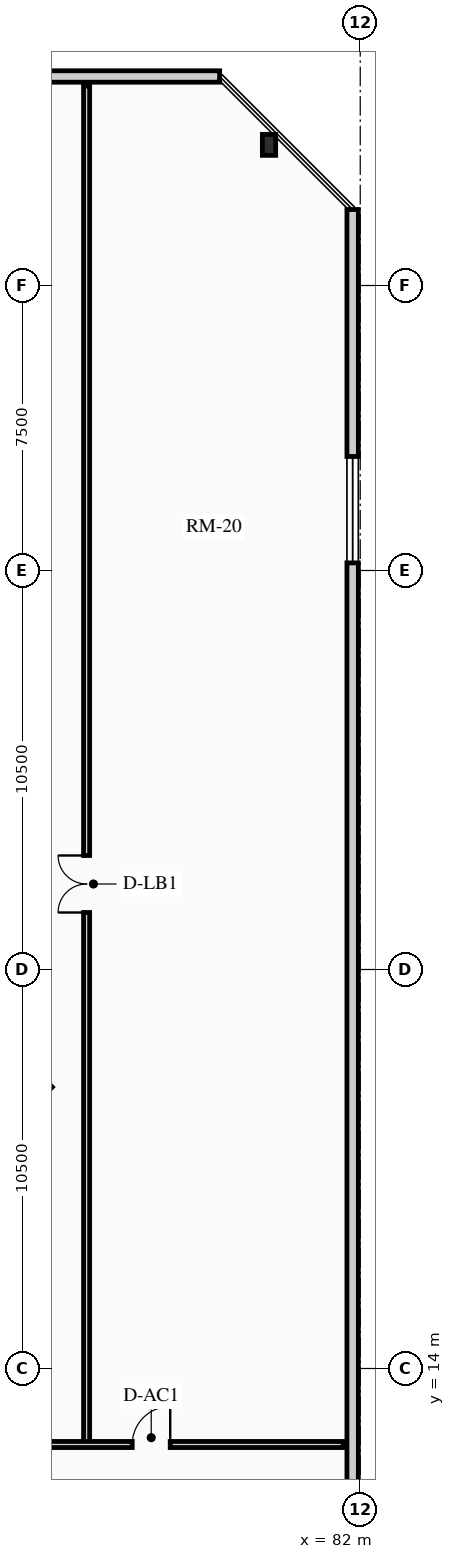
"""IFC4 building model, lengths in metres.
Left out: names, types, materials, properties, quantities, classifications, styles, units other than length and angle.
Written with IfcOpenShell. Run it as: python <this file> out.ifc"""

import sys

from ifc_helpers import new_model, si_unit, direction, frame, frame_2d, origin, origin_2d, place, context, subcontext, project, spatial, rectangle, hollow_rectangle, extrude, source, transform, mapped, element, fill, save


model = new_model("IFC4")
c1 = context("Model", 3, precision=1e-05, world=origin(), true_north=direction((0.0, 1.0)))
c2 = subcontext(c1, "Body", "Model", "MODEL_VIEW")
j1 = project(units=[si_unit("LENGTHUNIT", "METRE"), si_unit("PLANEANGLEUNIT", "RADIAN")], contexts=[c1])
p1 = place(None, origin())
s1 = spatial("IfcSite", under=j1, at=p1, CompositionType="ELEMENT")
p2 = place(p1, origin())
s2 = spatial("IfcBuilding", under=s1, at=p2, CompositionType="ELEMENT")
p3 = place(p2, frame((0.0, 0.0, 13.2)))
s3 = spatial("IfcBuildingStorey", under=s2, at=p3, CompositionType="ELEMENT", Elevation=13.2)
p4 = place(p3, frame((79.6, 46.2, 0.0), z_axis=(0.0, 0.0, 1.0), x_axis=(1.0, 0.0, 0.0)))
e1 = element("IfcColumn", 1, at=p4, inside=s3, PredefinedType="PILASTER", context=c2, shape_type="SweptSolid", body=[
    extrude(hollow_rectangle(XDim=0.35, YDim=0.55, WallThickness=0.022, at=origin_2d()), origin(), (0.0, 0.0, 1.0), 4.2),
])
p5 = place(p3, frame((3.8, 48.0, 0.0), z_axis=(0.0, 0.0, 1.0), x_axis=(1.0, 0.0, 0.0)))
e2 = element("IfcWall", 2, at=p5, inside=s3, PredefinedType="SOLIDWALL", context=c2, shape_type="SweptSolid", body=[
    extrude(rectangle(XDim=74.5, YDim=0.3, at=frame_2d((37.25, 0.0))), origin(), (0.0, 0.0, 1.0), 3.8),
])
m1 = source(origin(), c2, "Body", "SweptSolid", [
    extrude(rectangle(XDim=2.8, YDim=2.1, at=frame_2d((1.4, 1.05))), frame((0.0, 0.16, 0.0), z_axis=(0.0, -1.0, 0.0), x_axis=(1.0, 0.0, 0.0)), (0.0, 0.0, 1.0), 0.32),
])
p6 = place(p5, frame((6.5, 0.0, 0.8)))
e3 = element("IfcOpeningElement", 3, at=p6, cuts=e2, PredefinedType="OPENING", context=c2, shape_type="MappedRepresentation", body=[
    mapped(m1, transform((0.0, 0.0, 0.0), x_axis=(1.0, 0.0, 0.0), y_axis=(0.0, 1.0, 0.0), z_axis=(0.0, 0.0, 1.0), scale=1.0)),
])
p7 = place(p5, frame((39.5, 0.0, 0.8)))
e4 = element("IfcOpeningElement", 4, at=p7, cuts=e2, PredefinedType="OPENING", context=c2, shape_type="MappedRepresentation", body=[
    mapped(m1, transform((0.0, 0.0, 0.0), x_axis=(1.0, 0.0, 0.0), y_axis=(0.0, 1.0, 0.0), z_axis=(0.0, 0.0, 1.0), scale=1.0)),
])
p8 = place(p3, frame((81.8, 44.5, 0.0), z_axis=(0.0, 0.0, 1.0), x_axis=(0.0, -1.0, 0.0)))
e5 = element("IfcWall", 5, at=p8, inside=s3, PredefinedType="SOLIDWALL", context=c2, shape_type="SweptSolid", body=[
    extrude(rectangle(XDim=40.0, YDim=0.3, at=frame_2d((20.0, 0.0))), origin(), (0.0, 0.0, 1.0), 3.8),
])
p9 = place(p8, frame((6.5, 0.0, 0.8)))
e6 = element("IfcOpeningElement", 6, at=p9, cuts=e5, PredefinedType="OPENING", context=c2, shape_type="MappedRepresentation", body=[
    mapped(m1, transform((0.0, 0.0, 0.0), x_axis=(1.0, 0.0, 0.0), y_axis=(0.0, 1.0, 0.0), z_axis=(0.0, 0.0, 1.0), scale=1.0)),
])
p10 = place(p3, frame((74.8, 12.0, 0.0), z_axis=(0.0, 0.0, 1.0), x_axis=(0.0, 1.0, 0.0)))
e7 = element("IfcWall", 7, at=p10, inside=s3, PredefinedType="PARTITIONING", context=c2, shape_type="SweptSolid", body=[
    extrude(rectangle(XDim=35.75, YDim=0.16, at=frame_2d((17.875, 0.0))), origin(), (0.0, 0.0, 1.0), 2.844),
])
m2 = source(origin(), c2, "Body", "SweptSolid", [
    extrude(rectangle(XDim=1.5, YDim=2.02, at=frame_2d((0.75, 1.01))), frame((0.0, 0.09, 0.0), z_axis=(0.0, -1.0, 0.0), x_axis=(1.0, 0.0, 0.0)), (0.0, 0.0, 1.0), 0.18),
])
p11 = place(p10, frame((14.0, 0.0, 0.0)))
e8 = element("IfcOpeningElement", 8, at=p11, cuts=e7, PredefinedType="OPENING", context=c2, shape_type="MappedRepresentation", body=[
    mapped(m2, transform((0.0, 0.0, 0.0), x_axis=(1.0, 0.0, 0.0), y_axis=(0.0, 1.0, 0.0), z_axis=(0.0, 0.0, 1.0), scale=1.0)),
])
p12 = place(p3, frame((32.5, 12.0, 0.0), z_axis=(0.0, 0.0, 1.0), x_axis=(1.0, 0.0, 0.0)))
e9 = element("IfcWall", 9, at=p12, inside=s3, PredefinedType="PARTITIONING", context=c2, shape_type="SweptSolid", body=[
    extrude(rectangle(XDim=49.05, YDim=0.16, at=frame_2d((24.525, 0.0))), origin(), (0.0, 0.0, 1.0), 2.844),
])
p13 = place(p12, frame((5.5, 0.0, 0.0)))
e10 = element("IfcOpeningElement", 10, at=p13, cuts=e9, PredefinedType="OPENING", context=c2, shape_type="MappedRepresentation", body=[
    mapped(m2, transform((0.0, 0.0, 0.0), x_axis=(1.0, 0.0, 0.0), y_axis=(0.0, 1.0, 0.0), z_axis=(0.0, 0.0, 1.0), scale=1.0)),
])
m3 = source(origin(), c2, "Body", "SweptSolid", [
    extrude(rectangle(XDim=1.0, YDim=2.015, at=frame_2d((0.5, 1.007))), frame((0.0, 0.09, 0.0), z_axis=(0.0, -1.0, 0.0), x_axis=(1.0, 0.0, 0.0)), (0.0, 0.0, 1.0), 0.18),
])
p14 = place(p12, frame((43.5, 0.0, 0.0)))
e11 = element("IfcOpeningElement", 11, at=p14, cuts=e9, PredefinedType="OPENING", context=c2, shape_type="MappedRepresentation", body=[
    mapped(m3, transform((0.0, 0.0, 0.0), x_axis=(1.0, 0.0, 0.0), y_axis=(0.0, 1.0, 0.0), z_axis=(0.0, 0.0, 1.0), scale=1.0)),
])
m4 = source(origin(), c2, "Body", "SweptSolid", [
    extrude(rectangle(XDim=2.8, YDim=2.1, at=frame_2d((1.4, 1.05))), frame((0.0, 0.03, 0.0), z_axis=(0.0, -1.0, 0.0), x_axis=(1.0, 0.0, 0.0)), (0.0, 0.0, 1.0), 0.06),
])
p15 = place(p9, origin())
e12 = element("IfcWindow", 12, at=p15, inside=s3, PartitioningType="TRIPLE_PANEL_VERTICAL", PredefinedType="WINDOW", context=c2, shape_type="MappedRepresentation", body=[
    mapped(m4, transform((0.0, 0.0, 0.0), x_axis=(1.0, 0.0, 0.0), y_axis=(0.0, 1.0, 0.0), z_axis=(0.0, 0.0, 1.0), scale=1.0)),
])
fill(e6, e12)
m5 = source(origin(), c2, "Body", "SweptSolid", [
    extrude(rectangle(XDim=1.5, YDim=2.02, at=frame_2d((0.75, 1.01))), frame((0.0, 0.025, 0.0), z_axis=(0.0, -1.0, 0.0), x_axis=(1.0, 0.0, 0.0)), (0.0, 0.0, 1.0), 0.05),
])
p16 = place(p11, origin())
e13 = element("IfcDoor", 13, at=p16, inside=s3, OperationType="DOUBLE_DOOR_SINGLE_SWING", PredefinedType="DOOR", context=c2, shape_type="MappedRepresentation", body=[
    mapped(m5, transform((0.0, 0.0, 0.0), x_axis=(1.0, 0.0, 0.0), y_axis=(0.0, 1.0, 0.0), z_axis=(0.0, 0.0, 1.0), scale=1.0)),
])
fill(e8, e13)
m6 = source(origin(), c2, "Body", "SweptSolid", [
    extrude(rectangle(XDim=1.0, YDim=2.015, at=frame_2d((0.5, 1.007))), frame((0.0, 0.025, 0.0), z_axis=(0.0, -1.0, 0.0), x_axis=(1.0, 0.0, 0.0)), (0.0, 0.0, 1.0), 0.05),
])
p17 = place(p14, origin())
e14 = element("IfcDoor", 14, at=p17, inside=s3, OperationType="SINGLE_SWING_RIGHT", PredefinedType="DOOR", context=c2, shape_type="MappedRepresentation", body=[
    mapped(m6, transform((0.0, 0.0, 0.0), x_axis=(1.0, 0.0, 0.0), y_axis=(0.0, 1.0, 0.0), z_axis=(0.0, 0.0, 1.0), scale=1.0)),
])
fill(e11, e14)
save(model, sys.argv[1])
